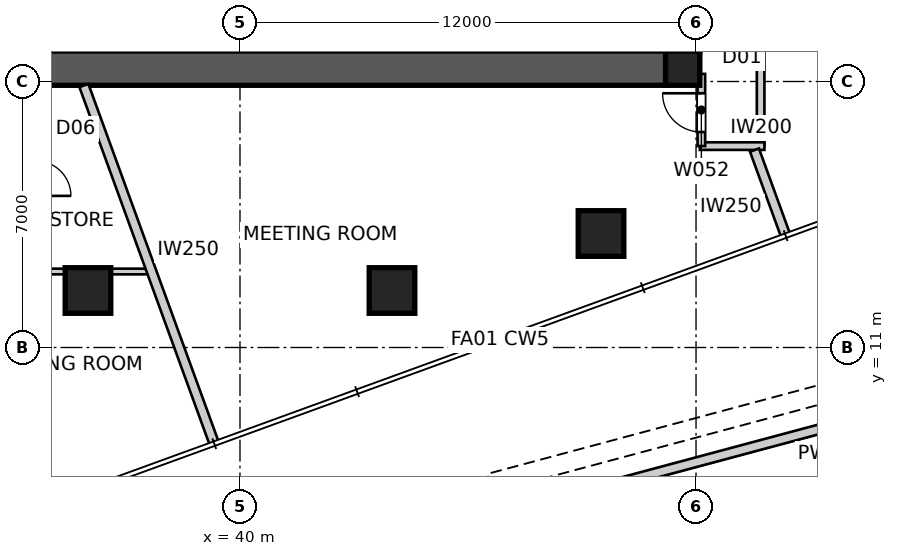
"""IFC4 building model, lengths in metres.
Left out: names, types, materials, properties, quantities, classifications, styles, units other than length and angle.
Written with IfcOpenShell. Run it as: python <this file> out.ifc"""

import sys

from ifc_helpers import new_model, si_unit, direction, frame, frame_2d, origin, origin_2d, place, context, subcontext, project, spatial, polyline, rectangle, outline, extrude, element, fill, save


model = new_model("IFC4")
c1 = context("Model", 3, precision=1e-05, world=origin(), true_north=direction((0.0, 1.0)))
c2 = subcontext(c1, "Body", "Model", "MODEL_VIEW")
j1 = project(units=[si_unit("LENGTHUNIT", "METRE"), si_unit("PLANEANGLEUNIT", "RADIAN")], contexts=[c1])
p1 = place(None, origin())
s1 = spatial("IfcSite", under=j1, at=p1, CompositionType="ELEMENT")
p2 = place(p1, origin())
s2 = spatial("IfcBuilding", under=s1, at=p2, CompositionType="ELEMENT")
p3 = place(p2, frame((0.0, 0.0, 138.8)))
s3 = spatial("IfcBuildingStorey", under=s2, at=p3, CompositionType="ELEMENT", Elevation=138.8)
p4 = place(p3, frame((51.2, 18.35, 0.0), z_axis=(0.0, 0.0, 1.0), x_axis=(-1.0, 0.0, 0.0)))
e1 = element("IfcWall", 1, at=p4, inside=s3, PredefinedType="SHEAR", context=c2, shape_type="SweptSolid", body=[
    extrude(outline(polyline([(0.0, -0.45), (22.4, -0.45), (22.4, -0.025), (22.85, -0.025), (22.85, 0.025), (22.4, 0.025), (22.4, 0.45), (0.0, 0.45), (0.0, 0.025), (-0.45, 0.025), (-0.45, -0.025), (0.0, -0.025), (0.0, -0.45)])), origin(), (0.0, 0.0, 1.0), 5.0),
])
p5 = place(p3, frame((51.65, 18.8, 0.0), z_axis=(0.0, 0.0, 1.0), x_axis=(0.0, 1.0, 0.0)))
e2 = element("IfcWall", 2, at=p5, inside=s3, PredefinedType="SHEAR", context=c2, shape_type="SweptSolid", body=[
    extrude(outline(polyline([(0.0, -0.45), (22.4, -0.45), (22.4, -0.025), (22.85, -0.025), (22.85, 0.025), (22.4, 0.025), (22.4, 0.45), (0.0, 0.45), (0.0, 0.025), (-0.45, 0.025), (-0.45, -0.025), (0.0, -0.025), (0.0, -0.45)])), origin(), (0.0, 0.0, 1.0), 5.0),
])
p6 = place(p5, frame((11.14, 0.0, 0.0)))
e3 = element("IfcOpeningElement", 3, at=p6, cuts=e2, PredefinedType="OPENING", context=c2, shape_type="SweptSolid", body=[
    extrude(rectangle(XDim=1.02, YDim=2.4, at=frame_2d((0.51, 1.2))), frame((0.0, 0.46, 0.0), z_axis=(0.0, -1.0, 0.0), x_axis=(1.0, 0.0, 0.0)), (0.0, 0.0, 1.0), 0.92),
])
p7 = place(p3, frame((51.65, 18.35, 0.0), z_axis=(0.0, 0.0, 1.0), x_axis=(1.0, 0.0, 0.0)))
e4 = element("IfcColumn", 4, at=p7, inside=s3, PredefinedType="COLUMN", context=c2, shape_type="SweptSolid", body=[
    extrude(rectangle(XDim=0.9, YDim=0.9, at=origin_2d()), origin(), (0.0, 0.0, 1.0), 5.0),
])
for number, where, z_axis, x_axis in (
    (5, (36.0, 12.5, 0.0), (0.0, 0.0, 1.0), (1.0, 0.0, 0.0)),
    (6, (44.0, 12.5, 0.0), (0.0, 0.0, 1.0), (1.0, 0.0, 0.0)),
    (7, (49.5, 14.0, 0.0), (0.0, 0.0, 1.0), (1.0, 0.0, 0.0)),
):
    element("IfcColumn", number, at=place(p3, frame(where, z_axis=z_axis, x_axis=x_axis)), inside=s3, PredefinedType="COLUMN", context=c2, shape_type="SweptSolid", body=[
        extrude(rectangle(XDim=1.2, YDim=1.2, at=origin_2d()), origin(), (0.0, 0.0, 1.0), 5.0),
    ])
p8 = place(p3, frame((41.801, 5.248, -0.05), z_axis=(0.0, 0.0, 1.0), x_axis=(0.965925409669, 0.258820599944, 0.0)))
e8 = element("IfcWall", 8, at=p8, inside=s3, PredefinedType="PARAPET", context=c2, shape_type="SweptSolid", body=[
    extrude(rectangle(XDim=29.167, YDim=0.25, at=frame_2d((14.583, 0.0))), origin(), (0.0, 0.0, 1.0), 1.15),
])
p9 = place(p3, frame((53.7, 16.3, 0.0), z_axis=(0.0, 0.0, 1.0), x_axis=(0.0, 1.0, 0.0)))
e9 = element("IfcWall", 9, at=p9, inside=s3, PredefinedType="PARTITIONING", context=c2, shape_type="SweptSolid", body=[
    extrude(rectangle(XDim=27.4, YDim=0.2, at=frame_2d((13.7, 0.0))), origin(), (0.0, 0.0, 1.0), 4.85),
])
p10 = place(p9, frame((18.075, 0.0, 0.0)))
e10 = element("IfcOpeningElement", 10, at=p10, cuts=e9, PredefinedType="OPENING", context=c2, shape_type="SweptSolid", body=[
    extrude(rectangle(XDim=1.02, YDim=2.34, at=frame_2d((0.51, 1.17))), frame((0.0, 0.11, 0.0), z_axis=(0.0, -1.0, 0.0), x_axis=(1.0, 0.0, 0.0)), (0.0, 0.0, 1.0), 0.22),
])
p11 = place(p9, frame((4.741, 0.0, 0.0)))
e11 = element("IfcOpeningElement", 11, at=p11, cuts=e9, PredefinedType="OPENING", context=c2, shape_type="SweptSolid", body=[
    extrude(rectangle(XDim=1.02, YDim=2.34, at=frame_2d((0.51, 1.17))), frame((0.0, 0.11, 0.0), z_axis=(0.0, -1.0, 0.0), x_axis=(1.0, 0.0, 0.0)), (0.0, 0.0, 1.0), 0.22),
])
p12 = place(p3, frame((52.1, 16.3, 0.0), z_axis=(0.0, 0.0, 1.0), x_axis=(1.0, 0.0, 0.0)))
e12 = element("IfcWall", 12, at=p12, inside=s3, PredefinedType="PARTITIONING", context=c2, shape_type="SweptSolid", body=[
    extrude(rectangle(XDim=1.7, YDim=0.2, at=frame_2d((0.85, 0.0))), origin(), (0.0, 0.0, 1.0), 4.85),
])
p13 = place(p3, frame((52.14, 16.3, 0.0), z_axis=(0.0, 0.0, 1.0), x_axis=(0.0, 1.0, 0.0)))
e13 = element("IfcWall", 13, at=p13, inside=s3, PredefinedType="PARTITIONING", context=c2, shape_type="SweptSolid", body=[
    extrude(rectangle(XDim=1.9, YDim=0.2, at=frame_2d((0.95, 0.0))), origin(), (0.0, 0.0, 1.0), 4.85),
])
p14 = place(p13, frame((0.37, 0.0, 0.0)))
e14 = element("IfcOpeningElement", 14, at=p14, cuts=e13, PredefinedType="OPENING", context=c2, shape_type="SweptSolid", body=[
    extrude(rectangle(XDim=1.02, YDim=2.34, at=frame_2d((0.51, 1.17))), frame((0.0, 0.11, 0.0), z_axis=(0.0, -1.0, 0.0), x_axis=(1.0, 0.0, 0.0)), (0.0, 0.0, 1.0), 0.22),
])
p15 = place(p3, frame((39.323, 8.47, 0.0), z_axis=(0.0, 0.0, 1.0), x_axis=(-0.342004948299, 0.939698151184, 0.0)))
e15 = element("IfcWall", 15, at=p15, inside=s3, PredefinedType="PARTITIONING", context=c2, shape_type="SweptSolid", body=[
    extrude(rectangle(XDim=10.03, YDim=0.25, at=frame_2d((5.015, 0.0))), origin(), (0.0, 0.0, 1.0), 4.85),
])
p16 = place(p3, frame((54.358, 13.942, 0.0), z_axis=(0.0, 0.0, 1.0), x_axis=(-0.342021098348, 0.939692273186, 0.0)))
e16 = element("IfcWall", 16, at=p16, inside=s3, PredefinedType="PARTITIONING", context=c2, shape_type="SweptSolid", body=[
    extrude(rectangle(XDim=2.397, YDim=0.25, at=frame_2d((1.198, 0.0))), origin(), (0.0, 0.0, 1.0), 4.85),
])
p17 = place(p3, frame((37.674, 13.0, 0.0), z_axis=(0.0, 0.0, 1.0), x_axis=(-1.0, 0.0, 0.0)))
e17 = element("IfcWall", 17, at=p17, inside=s3, PredefinedType="SOLIDWALL", context=c2, shape_type="SweptSolid", body=[
    extrude(rectangle(XDim=2.662, YDim=0.15, at=frame_2d((1.331, 0.0))), origin(), (0.0, 0.0, 1.0), 4.85),
])
p18 = place(p14, origin())
e18 = element("IfcDoor", 18, at=p18, inside=s3, OperationType="SINGLE_SWING_RIGHT", PredefinedType="DOOR", context=c2, shape_type="SweptSolid", body=[
    extrude(rectangle(XDim=1.02, YDim=2.34, at=frame_2d((0.51, 1.17))), frame((0.0, 0.025, 0.0), z_axis=(0.0, -1.0, 0.0), x_axis=(1.0, 0.0, 0.0)), (0.0, 0.0, 1.0), 0.05),
])
fill(e14, e18)
save(model, sys.argv[1])
